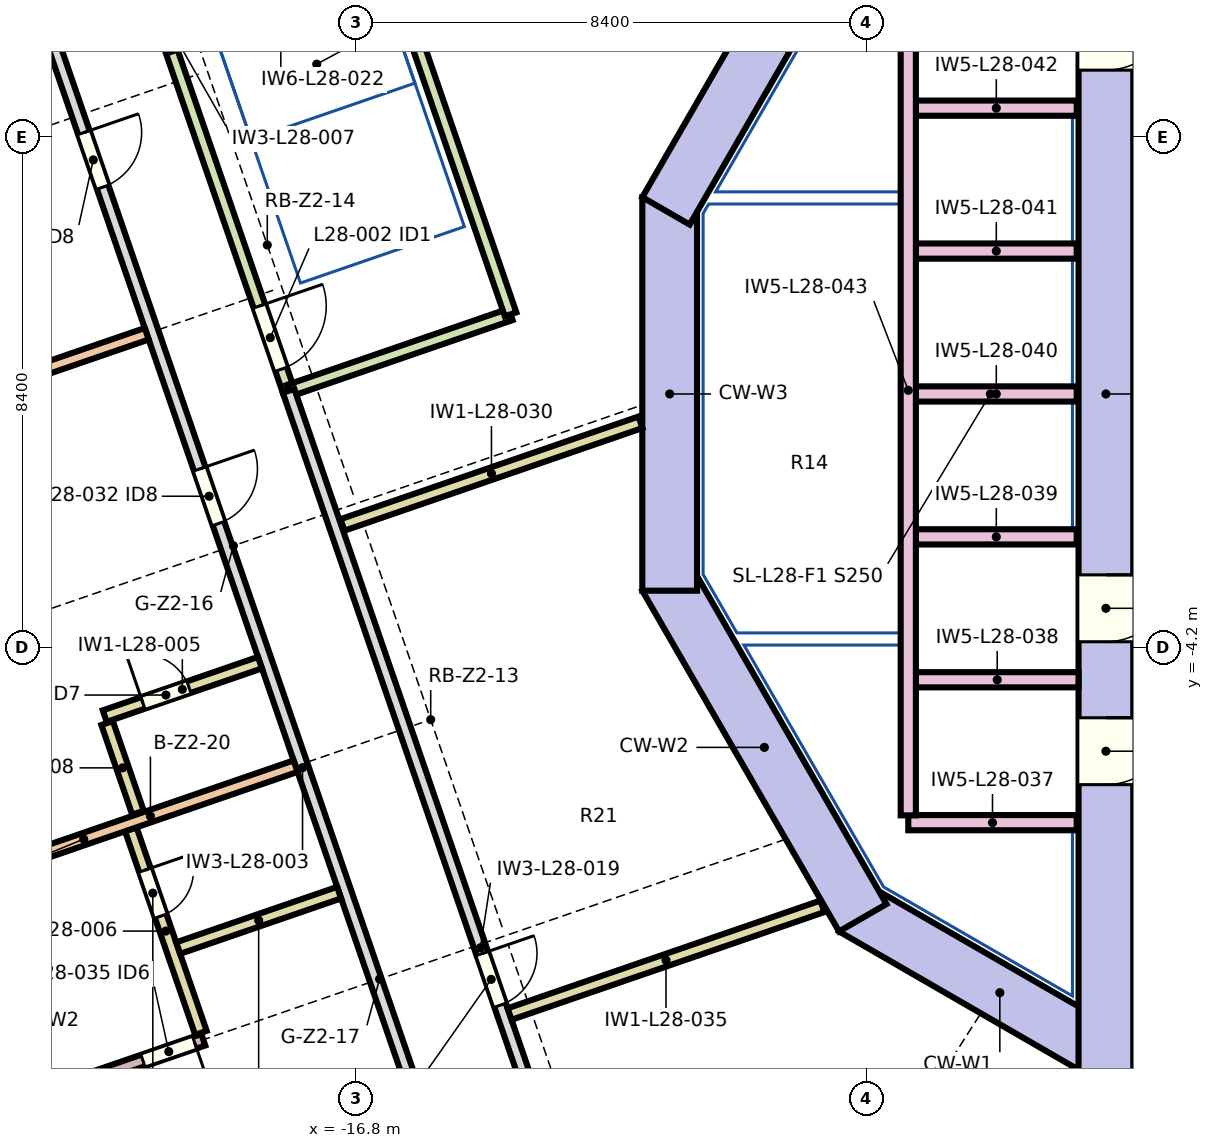
"""IFC4 building model, lengths in metres.
Left out: names, types, materials, properties, quantities, classifications, styles, units other than length and angle.
Written with IfcOpenShell. Run it as: python <this file> out.ifc"""

import sys

from ifc_helpers import new_model, si_unit, direction, frame, frame_2d, origin, place, context, subcontext, project, spatial, rectangle, extrude, element, fill, save


model = new_model("IFC4")
c1 = context("Model", 3, precision=1e-05, world=origin(), true_north=direction((0.0, 1.0)))
c2 = subcontext(c1, "Body", "Model", "MODEL_VIEW")
j1 = project(units=[si_unit("LENGTHUNIT", "METRE"), si_unit("PLANEANGLEUNIT", "RADIAN")], contexts=[c1])
p1 = place(None, origin())
s1 = spatial("IfcSite", under=j1, at=p1, CompositionType="ELEMENT")
p2 = place(p1, origin())
s2 = spatial("IfcBuilding", under=s1, at=p2, CompositionType="ELEMENT")
p3 = place(p2, frame((0.0, 0.0, 134.5)))
s3 = spatial("IfcBuildingStorey", under=s2, at=p3, CompositionType="ELEMENT", Elevation=134.5)
p4 = place(p3, frame((-3.775, -11.243, 0.0), z_axis=(0.0, 0.0, 1.0), x_axis=(-0.866026961591, 0.49999730179, 0.0)))
e1 = element("IfcWall", 1, at=p4, inside=s3, PredefinedType="SHEAR", context=c2, shape_type="SweptSolid", body=[
    extrude(rectangle(XDim=5.587, YDim=0.9, at=frame_2d((2.794, 0.0))), origin(), (0.0, 0.0, 1.0), 3.8),
])
p5 = place(p3, frame((-8.449, -8.614, 0.0), z_axis=(0.0, 0.0, 1.0), x_axis=(-0.499990282633, 0.866031014036, 0.0)))
e2 = element("IfcWall", 2, at=p5, inside=s3, PredefinedType="SHEAR", context=c2, shape_type="SweptSolid", body=[
    extrude(rectangle(XDim=6.47, YDim=0.9, at=frame_2d((3.235, 0.0))), origin(), (0.0, 0.0, 1.0), 3.8),
])
p6 = place(p3, frame((-11.624, -3.235, 0.0), z_axis=(0.0, 0.0, 1.0), x_axis=(0.0, 1.0, 0.0)))
e3 = element("IfcWall", 3, at=p6, inside=s3, PredefinedType="SHEAR", context=c2, shape_type="SweptSolid", body=[
    extrude(rectangle(XDim=6.471, YDim=0.9, at=frame_2d((3.235, 0.0))), origin(), (0.0, 0.0, 1.0), 3.8),
])
p7 = place(p3, frame((-11.684, 3.01, 0.0), z_axis=(0.0, 0.0, 1.0), x_axis=(0.499990282633, 0.866031014036, 0.0)))
e4 = element("IfcWall", 4, at=p7, inside=s3, PredefinedType="SHEAR", context=c2, shape_type="SweptSolid", body=[
    extrude(rectangle(XDim=6.47, YDim=0.9, at=frame_2d((3.235, 0.0))), origin(), (0.0, 0.0, 1.0), 3.8),
])
p8 = place(p3, frame((-4.45, 11.633, 0.0), z_axis=(0.0, 0.0, 1.0), x_axis=(0.0, -1.0, 0.0)))
e5 = element("IfcWall", 5, at=p8, inside=s3, PredefinedType="SHEAR", context=c2, shape_type="SweptSolid", body=[
    extrude(rectangle(XDim=23.265, YDim=0.9, at=frame_2d((11.633, 0.0))), origin(), (0.0, 0.0, 1.0), 3.8),
])
p9 = place(p8, frame((14.607, 0.0, 0.0)))
e6 = element("IfcOpeningElement", 6, at=p9, cuts=e5, PredefinedType="OPENING", context=c2, shape_type="SweptSolid", body=[
    extrude(rectangle(XDim=1.1, YDim=2.1, at=frame_2d((0.55, 1.05))), frame((0.0, 0.46, 0.0), z_axis=(0.0, -1.0, 0.0), x_axis=(1.0, 0.0, 0.0)), (0.0, 0.0, 1.0), 0.92),
])
p10 = place(p8, frame((16.958, 0.0, 0.0)))
e7 = element("IfcOpeningElement", 7, at=p10, cuts=e5, PredefinedType="OPENING", context=c2, shape_type="SweptSolid", body=[
    extrude(rectangle(XDim=1.1, YDim=2.1, at=frame_2d((0.55, 1.05))), frame((0.0, 0.46, 0.0), z_axis=(0.0, -1.0, 0.0), x_axis=(1.0, 0.0, 0.0)), (0.0, 0.0, 1.0), 0.92),
])
p11 = place(p8, frame((5.208, 0.0, 0.0)))
e8 = element("IfcOpeningElement", 8, at=p11, cuts=e5, PredefinedType="OPENING", context=c2, shape_type="SweptSolid", body=[
    extrude(rectangle(XDim=1.1, YDim=2.1, at=frame_2d((0.55, 1.05))), frame((0.0, 0.46, 0.0), z_axis=(0.0, -1.0, 0.0), x_axis=(1.0, 0.0, 0.0)), (0.0, 0.0, 1.0), 0.92),
])
p12 = place(p3, frame((-22.623, 8.265, 0.0), z_axis=(0.0, 0.0, 1.0), x_axis=(0.325567058058, -0.945518953119, 0.0)))
e9 = element("IfcWall", 9, at=p12, inside=s3, PredefinedType="PARTITIONING", context=c2, shape_type="SweptSolid", body=[
    extrude(rectangle(XDim=30.48, YDim=0.2, at=frame_2d((15.24, 0.0))), origin(), (0.0, 0.0, 1.0), 3.55),
])
p13 = place(p12, frame((4.195, 0.0, 0.0)))
e10 = element("IfcOpeningElement", 10, at=p13, cuts=e9, PredefinedType="OPENING", context=c2, shape_type="SweptSolid", body=[
    extrude(rectangle(XDim=0.95, YDim=2.1, at=frame_2d((0.475, 1.05))), frame((0.0, 0.11, 0.0), z_axis=(0.0, -1.0, 0.0), x_axis=(1.0, 0.0, 0.0)), (0.0, 0.0, 1.0), 0.22),
])
p14 = place(p12, frame((10.045, 0.0, 0.0)))
e11 = element("IfcOpeningElement", 11, at=p14, cuts=e9, PredefinedType="OPENING", context=c2, shape_type="SweptSolid", body=[
    extrude(rectangle(XDim=0.95, YDim=2.1, at=frame_2d((0.475, 1.05))), frame((0.0, 0.11, 0.0), z_axis=(0.0, -1.0, 0.0), x_axis=(1.0, 0.0, 0.0)), (0.0, 0.0, 1.0), 0.22),
])
p15 = place(p12, frame((21.42, 0.0, 0.0)))
e12 = element("IfcOpeningElement", 12, at=p15, cuts=e9, PredefinedType="OPENING", context=c2, shape_type="SweptSolid", body=[
    extrude(rectangle(XDim=1.0, YDim=2.1, at=frame_2d((0.5, 1.05))), frame((0.0, 0.11, 0.0), z_axis=(0.0, -1.0, 0.0), x_axis=(1.0, 0.0, 0.0)), (0.0, 0.0, 1.0), 0.22),
])
p16 = place(p12, frame((27.095, 0.0, 0.0)))
e13 = element("IfcOpeningElement", 13, at=p16, cuts=e9, PredefinedType="OPENING", context=c2, shape_type="SweptSolid", body=[
    extrude(rectangle(XDim=0.95, YDim=2.1, at=frame_2d((0.475, 1.05))), frame((0.0, 0.11, 0.0), z_axis=(0.0, -1.0, 0.0), x_axis=(1.0, 0.0, 0.0)), (0.0, 0.0, 1.0), 0.22),
])
p17 = place(p3, frame((-20.915, -5.298, 0.0), z_axis=(0.0, 0.0, 1.0), x_axis=(0.945508383903, 0.325597751787, 0.0)))
e14 = element("IfcWall", 14, at=p17, inside=s3, PredefinedType="PARTITIONING", context=c2, shape_type="SweptSolid", body=[
    extrude(rectangle(XDim=2.7, YDim=0.2, at=frame_2d((1.35, 0.0))), origin(), (0.0, 0.0, 1.0), 3.55),
])
p18 = place(p17, frame((0.664, 0.0, 0.0)))
e15 = element("IfcOpeningElement", 15, at=p18, cuts=e14, PredefinedType="OPENING", context=c2, shape_type="SweptSolid", body=[
    extrude(rectangle(XDim=0.8, YDim=2.1, at=frame_2d((0.4, 1.05))), frame((0.0, 0.11, 0.0), z_axis=(0.0, -1.0, 0.0), x_axis=(1.0, 0.0, 0.0)), (0.0, 0.0, 1.0), 0.22),
])
p19 = place(p3, frame((-20.485, -7.159, 0.0), z_axis=(0.0, 0.0, 1.0), x_axis=(0.325523047431, -0.945534105991, 0.0)))
e16 = element("IfcWall", 16, at=p19, inside=s3, PredefinedType="PARTITIONING", context=c2, shape_type="SweptSolid", body=[
    extrude(rectangle(XDim=3.54, YDim=0.2, at=frame_2d((1.77, 0.0))), origin(), (0.0, 0.0, 1.0), 3.55),
])
p20 = place(p19, frame((0.71, 0.0, 0.0)))
e17 = element("IfcOpeningElement", 17, at=p20, cuts=e16, PredefinedType="OPENING", context=c2, shape_type="SweptSolid", body=[
    extrude(rectangle(XDim=0.8, YDim=2.1, at=frame_2d((0.4, 1.05))), frame((0.0, 0.11, 0.0), z_axis=(0.0, -1.0, 0.0), x_axis=(1.0, 0.0, 0.0)), (0.0, 0.0, 1.0), 0.22),
])
p21 = place(p3, frame((-20.368, -6.886, 0.0), z_axis=(0.0, 0.0, 1.0), x_axis=(-0.325508352099, 0.945539165087, 0.0)))
e18 = element("IfcWall", 18, at=p21, inside=s3, PredefinedType="PARTITIONING", context=c2, shape_type="SweptSolid", body=[
    extrude(rectangle(XDim=1.56, YDim=0.2, at=frame_2d((0.78, 0.0))), origin(), (0.0, 0.0, 1.0), 3.55),
])
p22 = place(p3, frame((-20.224, 0.99, 0.0), z_axis=(0.0, 0.0, 1.0), x_axis=(-0.945516523202, -0.32557411499, 0.0)))
e19 = element("IfcWall", 19, at=p22, inside=s3, PredefinedType="PARTITIONING", context=c2, shape_type="SweptSolid", body=[
    extrude(rectangle(XDim=7.37, YDim=0.2, at=frame_2d((3.685, 0.0))), origin(), (0.0, 0.0, 1.0), 3.05),
])
p23 = place(p3, frame((-19.845, 5.724, 0.0), z_axis=(0.0, 0.0, 1.0), x_axis=(0.325563034341, -0.945520338581, 0.0)))
e20 = element("IfcWall", 20, at=p23, inside=s3, PredefinedType="SOLIDWALL", context=c2, shape_type="SweptSolid", body=[
    extrude(rectangle(XDim=6.0, YDim=0.2, at=frame_2d((3.0, 0.0))), origin(), (0.0, 0.0, 1.0), 3.55),
])
p24 = place(p23, frame((4.525, 0.0, 0.0)))
e21 = element("IfcOpeningElement", 21, at=p24, cuts=e20, PredefinedType="OPENING", context=c2, shape_type="SweptSolid", body=[
    extrude(rectangle(XDim=1.1, YDim=2.1, at=frame_2d((0.55, 1.05))), frame((0.0, 0.11, 0.0), z_axis=(0.0, -1.0, 0.0), x_axis=(1.0, 0.0, 0.0)), (0.0, 0.0, 1.0), 0.22),
])
p25 = place(p3, frame((-19.294, -10.62, 0.0), z_axis=(0.0, 0.0, 1.0), x_axis=(-0.945529593347, -0.325536154835, 0.0)))
e22 = element("IfcWall", 22, at=p25, inside=s3, PredefinedType="PARTITIONING", context=c2, shape_type="SweptSolid", body=[
    extrude(rectangle(XDim=4.47, YDim=0.2, at=frame_2d((2.235, 0.0))), origin(), (0.0, 0.0, 1.0), 2.65),
])
p26 = place(p25, frame((0.15, 0.0, 0.0)))
e23 = element("IfcOpeningElement", 23, at=p26, cuts=e22, PredefinedType="OPENING", context=c2, shape_type="SweptSolid", body=[
    extrude(rectangle(XDim=0.9, YDim=2.1, at=frame_2d((0.45, 1.05))), frame((0.0, 0.11, 0.0), z_axis=(0.0, -1.0, 0.0), x_axis=(1.0, 0.0, 0.0)), (0.0, 0.0, 1.0), 0.22),
])
p27 = place(p3, frame((-17.892, 0.051, 0.0), z_axis=(0.0, 0.0, 1.0), x_axis=(0.945514621213, 0.325579638603, 0.0)))
e24 = element("IfcWall", 24, at=p27, inside=s3, PredefinedType="SOLIDWALL", context=c2, shape_type="SweptSolid", body=[
    extrude(rectangle(XDim=3.863, YDim=0.2, at=frame_2d((1.931, 0.0))), origin(), (0.0, 0.0, 1.0), 3.55),
])
p28 = place(p3, frame((-17.892, 0.051, 0.0), z_axis=(0.0, 0.0, 1.0), x_axis=(0.325580537834, -0.94551431157, 0.0)))
e25 = element("IfcWall", 25, at=p28, inside=s3, PredefinedType="PARTITIONING", context=c2, shape_type="SweptSolid", body=[
    extrude(rectangle(XDim=19.374, YDim=0.2, at=frame_2d((9.687, 0.0))), origin(), (0.0, 0.0, 1.0), 3.55),
])
p29 = place(p28, frame((9.786, 0.0, 0.0)))
e26 = element("IfcOpeningElement", 26, at=p29, cuts=e25, PredefinedType="OPENING", context=c2, shape_type="SweptSolid", body=[
    extrude(rectangle(XDim=0.9, YDim=2.1, at=frame_2d((0.45, 1.05))), frame((0.0, 0.11, 0.0), z_axis=(0.0, -1.0, 0.0), x_axis=(1.0, 0.0, 0.0)), (0.0, 0.0, 1.0), 0.22),
])
p30 = place(p3, frame((-17.776, -6.121, 0.0), z_axis=(0.0, 0.0, 1.0), x_axis=(-0.945520034471, -0.325563917555, 0.0)))
e27 = element("IfcWall", 27, at=p30, inside=s3, PredefinedType="PARTITIONING", context=c2, shape_type="SweptSolid", body=[
    extrude(rectangle(XDim=7.37, YDim=0.2, at=frame_2d((3.685, 0.0))), origin(), (0.0, 0.0, 1.0), 3.05),
])
p31 = place(p3, frame((-17.06, -8.201, 0.0), z_axis=(0.0, 0.0, 1.0), x_axis=(-0.945515586558, -0.325576835135, 0.0)))
e28 = element("IfcWall", 28, at=p31, inside=s3, PredefinedType="PARTITIONING", context=c2, shape_type="SweptSolid", body=[
    extrude(rectangle(XDim=2.8, YDim=0.2, at=frame_2d((1.4, 0.0))), origin(), (0.0, 0.0, 1.0), 3.55),
])
p32 = place(p3, frame((-14.24, 1.309, 0.0), z_axis=(0.0, 0.0, 1.0), x_axis=(-0.325599106316, 0.945507917453, 0.0)))
e29 = element("IfcWall", 29, at=p32, inside=s3, PredefinedType="SOLIDWALL", context=c2, shape_type="SweptSolid", body=[
    extrude(rectangle(XDim=4.9, YDim=0.2, at=frame_2d((2.45, 0.0))), origin(), (0.0, 0.0, 1.0), 3.55),
])
p33 = place(p3, frame((-12.586, -20.515, 0.0), z_axis=(0.0, 0.0, 1.0), x_axis=(0.945519939336, 0.325564193852, 0.0)))
e30 = element("IfcWall", 30, at=p33, inside=s3, PredefinedType="PARTITIONING", context=c2, shape_type="SweptSolid", body=[
    extrude(rectangle(XDim=37.28, YDim=0.2, at=frame_2d((18.64, 0.0))), origin(), (0.0, 0.0, 1.0), 3.55),
])
p34 = place(p33, frame((9.83, 0.0, 0.0)))
e31 = element("IfcOpeningElement", 31, at=p34, cuts=e30, PredefinedType="OPENING", context=c2, shape_type="SweptSolid", body=[
    extrude(rectangle(XDim=1.0, YDim=2.1, at=frame_2d((0.5, 1.05))), frame((0.0, 0.11, 0.0), z_axis=(0.0, -1.0, 0.0), x_axis=(1.0, 0.0, 0.0)), (0.0, 0.0, 1.0), 0.22),
])
p35 = place(p33, frame((18.93, 0.0, 0.0)))
e32 = element("IfcOpeningElement", 32, at=p35, cuts=e30, PredefinedType="OPENING", context=c2, shape_type="SweptSolid", body=[
    extrude(rectangle(XDim=1.0, YDim=2.1, at=frame_2d((0.5, 1.05))), frame((0.0, 0.11, 0.0), z_axis=(0.0, -1.0, 0.0), x_axis=(1.0, 0.0, 0.0)), (0.0, 0.0, 1.0), 0.22),
])
p36 = place(p33, frame((30.28, 0.0, 0.0)))
e33 = element("IfcOpeningElement", 33, at=p36, cuts=e30, PredefinedType="OPENING", context=c2, shape_type="SweptSolid", body=[
    extrude(rectangle(XDim=1.0, YDim=2.1, at=frame_2d((0.5, 1.05))), frame((0.0, 0.11, 0.0), z_axis=(0.0, -1.0, 0.0), x_axis=(1.0, 0.0, 0.0)), (0.0, 0.0, 1.0), 0.22),
])
p37 = place(p33, frame((0.13, 0.0, 0.0)))
e34 = element("IfcOpeningElement", 34, at=p37, cuts=e30, PredefinedType="OPENING", context=c2, shape_type="SweptSolid", body=[
    extrude(rectangle(XDim=1.0, YDim=2.1, at=frame_2d((0.5, 1.05))), frame((0.0, 0.11, 0.0), z_axis=(0.0, -1.0, 0.0), x_axis=(1.0, 0.0, 0.0)), (0.0, 0.0, 1.0), 0.22),
])
p38 = place(p33, frame((34.23, 0.0, 0.0)))
e35 = element("IfcOpeningElement", 35, at=p38, cuts=e30, PredefinedType="OPENING", context=c2, shape_type="SweptSolid", body=[
    extrude(rectangle(XDim=1.1, YDim=2.1, at=frame_2d((0.55, 1.05))), frame((0.0, 0.11, 0.0), z_axis=(0.0, -1.0, 0.0), x_axis=(1.0, 0.0, 0.0)), (0.0, 0.0, 1.0), 0.22),
])
p39 = place(p3, frame((-12.104, -0.466, 0.0), z_axis=(0.0, 0.0, 1.0), x_axis=(-0.945514533015, -0.325579894737, 0.0)))
e36 = element("IfcWall", 36, at=p39, inside=s3, PredefinedType="PARTITIONING", context=c2, shape_type="SweptSolid", body=[
    extrude(rectangle(XDim=5.184, YDim=0.2, at=frame_2d((2.592, 0.0))), origin(), (0.0, 0.0, 1.0), 3.55),
])
p40 = place(p3, frame((-9.112, -8.426, 0.0), z_axis=(0.0, 0.0, 1.0), x_axis=(-0.945518793757, -0.32556752088, 0.0)))
e37 = element("IfcWall", 37, at=p40, inside=s3, PredefinedType="PARTITIONING", context=c2, shape_type="SweptSolid", body=[
    extrude(rectangle(XDim=5.441, YDim=0.2, at=frame_2d((2.721, 0.0))), origin(), (0.0, 0.0, 1.0), 3.55),
])
p41 = place(p3, frame((-7.7, -7.05, 0.0), z_axis=(0.0, 0.0, 1.0), x_axis=(1.0, 0.0, 0.0)))
e38 = element("IfcWall", 38, at=p41, inside=s3, PredefinedType="SOLIDWALL", context=c2, shape_type="SweptSolid", body=[
    extrude(rectangle(XDim=2.77, YDim=0.25, at=frame_2d((1.385, 0.0))), origin(), (0.0, 0.0, 1.0), 3.55),
])
p42 = place(p3, frame((-7.575, -4.7, 0.0), z_axis=(0.0, 0.0, 1.0), x_axis=(1.0, 0.0, 0.0)))
e39 = element("IfcWall", 39, at=p42, inside=s3, PredefinedType="SOLIDWALL", context=c2, shape_type="SweptSolid", body=[
    extrude(rectangle(XDim=2.675, YDim=0.25, at=frame_2d((1.337, 0.0))), origin(), (0.0, 0.0, 1.0), 3.55),
])
for number, where, z_axis, x_axis in (
    (40, (-7.575, -2.35, 0.0), (0.0, 0.0, 1.0), (1.0, 0.0, 0.0)),
    (41, (-7.575, 0.0, 0.0), (0.0, 0.0, 1.0), (1.0, 0.0, 0.0)),
    (42, (-7.575, 2.35, 0.0), (0.0, 0.0, 1.0), (1.0, 0.0, 0.0)),
    (43, (-7.575, 4.7, 0.0), (0.0, 0.0, 1.0), (1.0, 0.0, 0.0)),
):
    element("IfcWall", number, at=place(p3, frame(where, z_axis=z_axis, x_axis=x_axis)), inside=s3, PredefinedType="SOLIDWALL", context=c2, shape_type="SweptSolid", body=[
        extrude(rectangle(XDim=2.645, YDim=0.25, at=frame_2d((1.323, 0.0))), origin(), (0.0, 0.0, 1.0), 3.55),
    ])
p43 = place(p3, frame((-7.7, 7.05, 0.0), z_axis=(0.0, 0.0, 1.0), x_axis=(0.0, -1.0, 0.0)))
e44 = element("IfcWall", 44, at=p43, inside=s3, PredefinedType="SOLIDWALL", context=c2, shape_type="SweptSolid", body=[
    extrude(rectangle(XDim=13.98, YDim=0.25, at=frame_2d((6.99, 0.0))), origin(), (0.0, 0.0, 1.0), 3.55),
])
p44 = place(p24, origin())
e45 = element("IfcDoor", 45, at=p44, inside=s3, OperationType="NOTDEFINED", PredefinedType="DOOR", context=c2, shape_type="SweptSolid", body=[
    extrude(rectangle(XDim=1.1, YDim=2.1, at=frame_2d((0.55, 1.05))), frame((0.0, 0.025, 0.0), z_axis=(0.0, -1.0, 0.0), x_axis=(1.0, 0.0, 0.0)), (0.0, 0.0, 1.0), 0.05),
])
fill(e21, e45)
p45 = place(p29, origin())
e46 = element("IfcDoor", 46, at=p45, inside=s3, OperationType="NOTDEFINED", PredefinedType="DOOR", context=c2, shape_type="SweptSolid", body=[
    extrude(rectangle(XDim=0.9, YDim=2.1, at=frame_2d((0.45, 1.05))), frame((0.0, 0.025, 0.0), z_axis=(0.0, -1.0, 0.0), x_axis=(1.0, 0.0, 0.0)), (0.0, 0.0, 1.0), 0.05),
])
fill(e26, e46)
p46 = place(p13, origin())
e47 = element("IfcDoor", 47, at=p46, inside=s3, OperationType="NOTDEFINED", PredefinedType="DOOR", context=c2, shape_type="SweptSolid", body=[
    extrude(rectangle(XDim=0.95, YDim=2.1, at=frame_2d((0.475, 1.05))), frame((0.0, 0.025, 0.0), z_axis=(0.0, -1.0, 0.0), x_axis=(1.0, 0.0, 0.0)), (0.0, 0.0, 1.0), 0.05),
])
fill(e10, e47)
p47 = place(p14, origin())
e48 = element("IfcDoor", 48, at=p47, inside=s3, OperationType="NOTDEFINED", PredefinedType="DOOR", context=c2, shape_type="SweptSolid", body=[
    extrude(rectangle(XDim=0.95, YDim=2.1, at=frame_2d((0.475, 1.05))), frame((0.0, 0.025, 0.0), z_axis=(0.0, -1.0, 0.0), x_axis=(1.0, 0.0, 0.0)), (0.0, 0.0, 1.0), 0.05),
])
fill(e11, e48)
p48 = place(p18, origin())
e49 = element("IfcDoor", 49, at=p48, inside=s3, OperationType="NOTDEFINED", PredefinedType="DOOR", context=c2, shape_type="SweptSolid", body=[
    extrude(rectangle(XDim=0.8, YDim=2.1, at=frame_2d((0.4, 1.05))), frame((0.0, 0.025, 0.0), z_axis=(0.0, -1.0, 0.0), x_axis=(1.0, 0.0, 0.0)), (0.0, 0.0, 1.0), 0.05),
])
fill(e15, e49)
p49 = place(p26, origin())
e50 = element("IfcDoor", 50, at=p49, inside=s3, OperationType="NOTDEFINED", PredefinedType="DOOR", context=c2, shape_type="SweptSolid", body=[
    extrude(rectangle(XDim=0.9, YDim=2.1, at=frame_2d((0.45, 1.05))), frame((0.0, 0.025, 0.0), z_axis=(0.0, -1.0, 0.0), x_axis=(1.0, 0.0, 0.0)), (0.0, 0.0, 1.0), 0.05),
])
fill(e23, e50)
p50 = place(p20, origin())
e51 = element("IfcDoor", 51, at=p50, inside=s3, OperationType="NOTDEFINED", PredefinedType="DOOR", context=c2, shape_type="SweptSolid", body=[
    extrude(rectangle(XDim=0.8, YDim=2.1, at=frame_2d((0.4, 1.05))), frame((0.0, 0.025, 0.0), z_axis=(0.0, -1.0, 0.0), x_axis=(1.0, 0.0, 0.0)), (0.0, 0.0, 1.0), 0.05),
])
fill(e17, e51)
p51 = place(p9, origin())
e52 = element("IfcDoor", 52, at=p51, inside=s3, OperationType="SLIDING_TO_LEFT", PredefinedType="DOOR", context=c2, shape_type="SweptSolid", body=[
    extrude(rectangle(XDim=1.1, YDim=2.1, at=frame_2d((0.55, 1.05))), frame((0.0, 0.025, 0.0), z_axis=(0.0, -1.0, 0.0), x_axis=(1.0, 0.0, 0.0)), (0.0, 0.0, 1.0), 0.05),
])
fill(e6, e52)
p52 = place(p10, origin())
e53 = element("IfcDoor", 53, at=p52, inside=s3, OperationType="SLIDING_TO_LEFT", PredefinedType="DOOR", context=c2, shape_type="SweptSolid", body=[
    extrude(rectangle(XDim=1.1, YDim=2.1, at=frame_2d((0.55, 1.05))), frame((0.0, 0.025, 0.0), z_axis=(0.0, -1.0, 0.0), x_axis=(1.0, 0.0, 0.0)), (0.0, 0.0, 1.0), 0.05),
])
fill(e7, e53)
p53 = place(p11, origin())
e54 = element("IfcDoor", 54, at=p53, inside=s3, OperationType="SLIDING_TO_LEFT", PredefinedType="DOOR", context=c2, shape_type="SweptSolid", body=[
    extrude(rectangle(XDim=1.1, YDim=2.1, at=frame_2d((0.55, 1.05))), frame((0.0, 0.025, 0.0), z_axis=(0.0, -1.0, 0.0), x_axis=(1.0, 0.0, 0.0)), (0.0, 0.0, 1.0), 0.05),
])
fill(e8, e54)
save(model, sys.argv[1])
